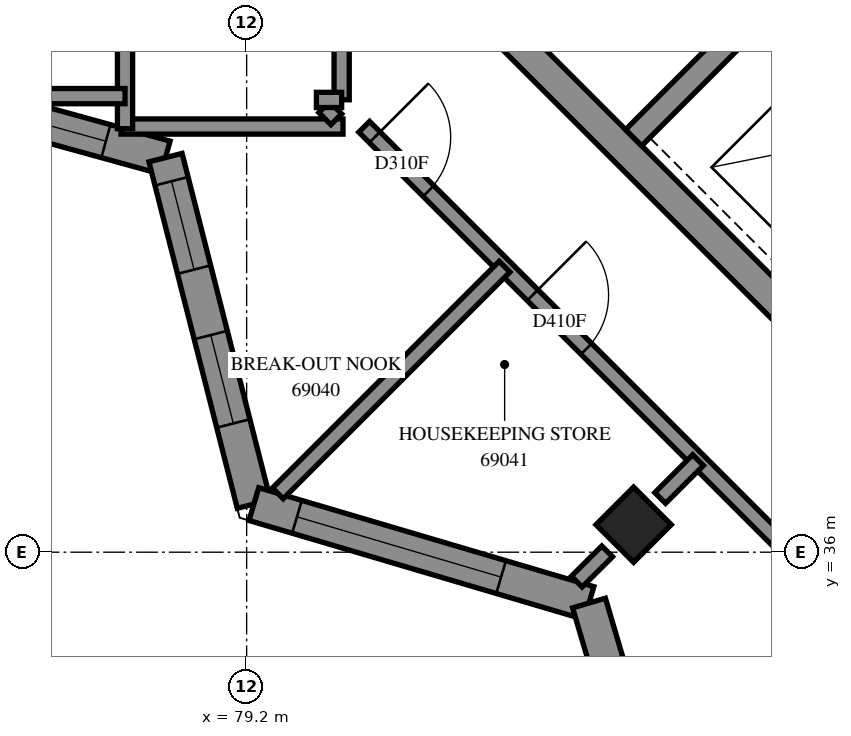
"""IFC4 building model, lengths in metres.
Left out: names, types, materials, properties, quantities, classifications, styles, units other than length and angle.
Written with IfcOpenShell. Run it as: python <this file> out.ifc"""

import sys

from ifc_helpers import new_model, si_unit, direction, frame, frame_2d, origin, origin_2d, place, context, subcontext, project, spatial, polyline, rectangle, outline, extrude, element, fill, save


model = new_model("IFC4")
c1 = context("Model", 3, precision=1e-05, world=origin(), true_north=direction((0.0, 1.0)))
c2 = subcontext(c1, "Body", "Model", "MODEL_VIEW")
j1 = project(units=[si_unit("LENGTHUNIT", "METRE"), si_unit("PLANEANGLEUNIT", "RADIAN")], contexts=[c1])
p1 = place(None, origin())
s1 = spatial("IfcSite", under=j1, at=p1, CompositionType="ELEMENT")
p2 = place(p1, origin())
s2 = spatial("IfcBuilding", under=s1, at=p2, CompositionType="ELEMENT")
p3 = place(p2, frame((0.0, 0.0, 254.0)))
s3 = spatial("IfcBuildingStorey", under=s2, at=p3, CompositionType="ELEMENT", Elevation=254.0)
p4 = place(p3, frame((84.291, 36.362, 0.0), z_axis=(0.0, 0.0, 1.0), x_axis=(0.7071067812, -0.7071067812, 0.0)))
e1 = element("IfcColumn", 1, at=p4, inside=s3, PredefinedType="COLUMN", context=c2, shape_type="SweptSolid", body=[
    extrude(rectangle(XDim=0.7, YDim=0.7, at=origin_2d()), origin(), (0.0, 0.0, 1.0), 3.1),
])
p5 = place(p3, frame((76.23, 49.231, -0.3), z_axis=(0.0, 0.0, 1.0), x_axis=(0.7071034917, -0.7071100706, 0.0)))
e2 = element("IfcWall", 2, at=p5, inside=s3, PredefinedType="SHEAR", context=c2, shape_type="SweptSolid", body=[
    extrude(rectangle(XDim=15.2, YDim=0.4, at=frame_2d((7.6, 0.0))), origin(), (0.0, 0.0, 1.0), 2.7),
])
p6 = place(p3, frame((84.291, 41.453, 0.0), z_axis=(0.0, 0.0, 1.0), x_axis=(0.7071067812, 0.7071067812, 0.0)))
e3 = element("IfcWall", 3, at=p6, inside=s3, PredefinedType="SOLIDWALL", context=c2, shape_type="SweptSolid", body=[
    extrude(rectangle(XDim=3.3, YDim=0.3, at=frame_2d((1.65, 0.0))), origin(), (0.0, 0.0, 1.0), 3.1),
])
p7 = place(p3, frame((78.988, 51.423, 0.0), z_axis=(0.0, 0.0, 1.0), x_axis=(0.7071067812, -0.7071067812, 0.0)))
e4 = element("IfcWall", 4, at=p7, inside=s3, PredefinedType="SOLIDWALL", context=c2, shape_type="SweptSolid", body=[
    extrude(rectangle(XDim=14.4, YDim=0.3, at=frame_2d((7.2, 0.0))), origin(), (0.0, 0.0, 1.0), 3.1),
])
p8 = place(p7, frame((1.35, 0.0, 0.0)))
e5 = element("IfcOpeningElement", 5, at=p8, cuts=e4, PredefinedType="OPENING", context=c2, shape_type="SweptSolid", body=[
    extrude(rectangle(XDim=0.9, YDim=2.1, at=frame_2d((0.45, 1.05))), frame((0.0, 0.16, 0.0), z_axis=(0.0, -1.0, 0.0), x_axis=(1.0, 0.0, 0.0)), (0.0, 0.0, 1.0), 0.32),
])
p9 = place(p7, frame((4.95, 0.0, 0.0)))
e6 = element("IfcOpeningElement", 6, at=p9, cuts=e4, PredefinedType="OPENING", context=c2, shape_type="SweptSolid", body=[
    extrude(rectangle(XDim=0.9, YDim=2.1, at=frame_2d((0.45, 1.05))), frame((0.0, 0.16, 0.0), z_axis=(0.0, -1.0, 0.0), x_axis=(1.0, 0.0, 0.0)), (0.0, 0.0, 1.0), 0.32),
])
p10 = place(p7, frame((8.55, 0.0, 0.0)))
e7 = element("IfcOpeningElement", 7, at=p10, cuts=e4, PredefinedType="OPENING", context=c2, shape_type="SweptSolid", body=[
    extrude(rectangle(XDim=0.9, YDim=2.1, at=frame_2d((0.45, 1.05))), frame((0.0, 0.16, 0.0), z_axis=(0.0, -1.0, 0.0), x_axis=(1.0, 0.0, 0.0)), (0.0, 0.0, 1.0), 0.32),
])
p11 = place(p7, frame((12.05, 0.0, 0.0)))
e8 = element("IfcOpeningElement", 8, at=p11, cuts=e4, PredefinedType="OPENING", context=c2, shape_type="SweptSolid", body=[
    extrude(rectangle(XDim=1.1, YDim=2.1, at=frame_2d((0.55, 1.05))), frame((0.0, 0.16, 0.0), z_axis=(0.0, -1.0, 0.0), x_axis=(1.0, 0.0, 0.0)), (0.0, 0.0, 1.0), 0.32),
])
p12 = place(p3, frame((74.372, 42.228, 0.0), z_axis=(0.0, 0.0, 1.0), x_axis=(0.9640145949, -0.2658493196, 0.0)))
e9 = element("IfcWall", 9, at=p12, inside=s3, PredefinedType="SOLIDWALL", context=c2, shape_type="SweptSolid", body=[
    extrude(outline(polyline([(0.043, -0.225), (3.771, -0.225), (4.032, 0.225), (-0.043, 0.225), (0.043, -0.225)])), origin(), (0.0, 0.0, 1.0), 3.1),
])
p13 = place(p12, frame((1.887, 0.0, 0.45)))
e10 = element("IfcOpeningElement", 10, at=p13, cuts=e9, PredefinedType="OPENING", context=c2, shape_type="SweptSolid", body=[
    extrude(rectangle(XDim=1.2, YDim=2.55, at=frame_2d((0.6, 1.275))), frame((0.0, 0.235, 0.0), z_axis=(0.0, -1.0, 0.0), x_axis=(1.0, 0.0, 0.0)), (0.0, 0.0, 1.0), 0.47),
])
p14 = place(p3, frame((78.133, 41.191, 0.0), z_axis=(0.0, 0.0, 1.0), x_axis=(0.2471093733, -0.9689875942, 0.0)))
e11 = element("IfcWall", 11, at=p14, inside=s3, PredefinedType="SOLIDWALL", context=c2, shape_type="SweptSolid", body=[
    extrude(outline(polyline([(0.131, -0.225), (4.832, -0.225), (4.577, 0.225), (-0.131, 0.225), (0.131, -0.225)])), origin(), (0.0, 0.0, 1.0), 3.1),
])
p15 = place(p14, frame((0.321, 0.0, 0.45)))
e12 = element("IfcOpeningElement", 12, at=p15, cuts=e11, PredefinedType="OPENING", context=c2, shape_type="SweptSolid", body=[
    extrude(rectangle(XDim=1.2, YDim=2.55, at=frame_2d((0.6, 1.275))), frame((0.0, 0.235, 0.0), z_axis=(0.0, -1.0, 0.0), x_axis=(1.0, 0.0, 0.0)), (0.0, 0.0, 1.0), 0.47),
])
p16 = place(p14, frame((2.409, 0.0, 0.45)))
e13 = element("IfcOpeningElement", 13, at=p16, cuts=e11, PredefinedType="OPENING", context=c2, shape_type="SweptSolid", body=[
    extrude(rectangle(XDim=1.2, YDim=2.55, at=frame_2d((0.6, 1.275))), frame((0.0, 0.235, 0.0), z_axis=(0.0, -1.0, 0.0), x_axis=(1.0, 0.0, 0.0)), (0.0, 0.0, 1.0), 0.47),
])
p17 = place(p3, frame((79.295, 36.633, 0.0), z_axis=(0.0, 0.0, 1.0), x_axis=(0.959077868, -0.2831424432, 0.0)))
e14 = element("IfcWall", 14, at=p17, inside=s3, PredefinedType="SOLIDWALL", context=c2, shape_type="SweptSolid", body=[
    extrude(outline(polyline([(-0.128, -0.225), (4.475, -0.225), (4.72, 0.225), (0.128, 0.225), (-0.128, -0.225)])), origin(), (0.0, 0.0, 1.0), 3.1),
])
p18 = place(p17, frame((0.591, 0.0, 0.45)))
e15 = element("IfcOpeningElement", 15, at=p18, cuts=e14, PredefinedType="OPENING", context=c2, shape_type="SweptSolid", body=[
    extrude(rectangle(XDim=2.8, YDim=2.55, at=frame_2d((1.4, 1.275))), frame((0.0, 0.235, 0.0), z_axis=(0.0, -1.0, 0.0), x_axis=(1.0, 0.0, 0.0)), (0.0, 0.0, 1.0), 0.47),
])
p19 = place(p3, frame((83.704, 35.331, 0.0), z_axis=(0.0, 0.0, 1.0), x_axis=(0.2831424432, -0.959077868, 0.0)))
e16 = element("IfcWall", 16, at=p19, inside=s3, PredefinedType="SOLIDWALL", context=c2, shape_type="SweptSolid", body=[
    extrude(outline(polyline([(0.122, -0.225), (4.725, -0.225), (4.469, 0.225), (-0.122, 0.225), (0.122, -0.225)])), origin(), (0.0, 0.0, 1.0), 3.1),
])
p20 = place(p19, frame((1.028, 0.0, 0.45)))
e17 = element("IfcOpeningElement", 17, at=p20, cuts=e16, PredefinedType="OPENING", context=c2, shape_type="SweptSolid", body=[
    extrude(rectangle(XDim=1.2, YDim=2.55, at=frame_2d((0.6, 1.275))), frame((0.0, 0.235, 0.0), z_axis=(0.0, -1.0, 0.0), x_axis=(1.0, 0.0, 0.0)), (0.0, 0.0, 1.0), 0.47),
])
p21 = place(p3, frame((84.944, 31.927, 0.0), z_axis=(0.0, 0.0, 1.0), x_axis=(0.7071768334, 0.7070367221, 0.0)))
e18 = element("IfcWall", 18, at=p21, inside=s3, PredefinedType="PARTITIONING", context=c2, shape_type="SweptSolid", body=[
    extrude(rectangle(XDim=14.274, YDim=0.2, at=frame_2d((7.137, 0.0))), origin(), (0.0, 0.0, 1.0), 3.1),
])
p22 = place(p3, frame((80.747, 41.597, 0.0), z_axis=(0.0, 0.0, 1.0), x_axis=(0.7071067812, -0.7071067812, 0.0)))
e19 = element("IfcWall", 19, at=p22, inside=s3, PredefinedType="PARTITIONING", context=c2, shape_type="SweptSolid", body=[
    extrude(rectangle(XDim=8.607, YDim=0.2, at=frame_2d((4.303, 0.0))), origin(), (0.0, 0.0, 1.0), 3.1),
])
p23 = place(p22, frame((0.195, 0.0, 0.0)))
e20 = element("IfcOpeningElement", 20, at=p23, cuts=e19, PredefinedType="OPENING", context=c2, shape_type="SweptSolid", body=[
    extrude(rectangle(XDim=1.0, YDim=2.1, at=frame_2d((0.5, 1.05))), frame((0.0, 0.11, 0.0), z_axis=(0.0, -1.0, 0.0), x_axis=(1.0, 0.0, 0.0)), (0.0, 0.0, 1.0), 0.22),
])
p24 = place(p22, frame((3.133, 0.0, 0.0)))
e21 = element("IfcOpeningElement", 21, at=p24, cuts=e19, PredefinedType="OPENING", context=c2, shape_type="SweptSolid", body=[
    extrude(rectangle(XDim=1.0, YDim=2.1, at=frame_2d((0.5, 1.05))), frame((0.0, 0.11, 0.0), z_axis=(0.0, -1.0, 0.0), x_axis=(1.0, 0.0, 0.0)), (0.0, 0.0, 1.0), 0.22),
])
p25 = place(p3, frame((79.611, 36.774, 0.0), z_axis=(0.0, 0.0, 1.0), x_axis=(0.7071186348, 0.7070949274, 0.0)))
e22 = element("IfcWall", 22, at=p25, inside=s3, PredefinedType="PARTITIONING", context=c2, shape_type="SweptSolid", body=[
    extrude(rectangle(XDim=4.218, YDim=0.2, at=frame_2d((2.109, 0.0))), origin(), (0.0, 0.0, 1.0), 3.1),
])
p26 = place(p3, frame((77.546, 41.6, 0.0), z_axis=(0.0, 0.0, 1.0), x_axis=(1.0, 0.0, 0.0)))
e23 = element("IfcWall", 23, at=p26, inside=s3, PredefinedType="PARTITIONING", context=c2, shape_type="SweptSolid", body=[
    extrude(rectangle(XDim=2.921, YDim=0.2, at=frame_2d((1.461, 0.0))), origin(), (0.0, 0.0, 1.0), 3.1),
])
p27 = place(p3, frame((77.6, 41.572, 0.0), z_axis=(0.0, 0.0, 1.0), x_axis=(0.0, 1.0, 0.0)))
e24 = element("IfcWall", 24, at=p27, inside=s3, PredefinedType="PARTITIONING", context=c2, shape_type="SweptSolid", body=[
    extrude(rectangle(XDim=2.897, YDim=0.2, at=frame_2d((1.448, 0.0))), origin(), (0.0, 0.0, 1.0), 3.1),
])
p28 = place(p3, frame((80.45, 41.952, 0.0), z_axis=(0.0, 0.0, 1.0), x_axis=(0.0, 1.0, 0.0)))
e25 = element("IfcWall", 25, at=p28, inside=s3, PredefinedType="PARTITIONING", context=c2, shape_type="SweptSolid", body=[
    extrude(rectangle(XDim=2.498, YDim=0.2, at=frame_2d((1.249, 0.0))), origin(), (0.0, 0.0, 1.0), 3.1),
])
p29 = place(p3, frame((76.096, 42.0, 0.0), z_axis=(0.0, 0.0, 1.0), x_axis=(1.0, 0.0, 0.0)))
e26 = element("IfcWall", 26, at=p29, inside=s3, PredefinedType="PARTITIONING", context=c2, shape_type="SweptSolid", body=[
    extrude(rectangle(XDim=1.504, YDim=0.2, at=frame_2d((0.752, 0.0))), origin(), (0.0, 0.0, 1.0), 3.1),
])
p30 = place(p3, frame((84.641, 36.713, 0.0), z_axis=(0.0, 0.0, 1.0), x_axis=(0.7071067812, 0.7071067812, 0.0)))
e27 = element("IfcWall", 27, at=p30, inside=s3, PredefinedType="PARTITIONING", context=c2, shape_type="SweptSolid", body=[
    extrude(rectangle(XDim=0.704, YDim=0.2, at=frame_2d((0.352, 0.0))), origin(), (0.0, 0.0, 1.0), 3.1),
])
p31 = place(p3, frame((83.543, 35.613, 0.0), z_axis=(0.0, 0.0, 1.0), x_axis=(0.7092312739, 0.7049758862, 0.0)))
e28 = element("IfcWall", 28, at=p31, inside=s3, PredefinedType="PARTITIONING", context=c2, shape_type="SweptSolid", body=[
    extrude(rectangle(XDim=0.564, YDim=0.2, at=frame_2d((0.282, 0.0))), origin(), (0.0, 0.0, 1.0), 3.1),
])
p32 = place(p3, frame((80.221, 41.855, 0.0), z_axis=(0.0, 0.0, 1.0), x_axis=(0.7068844555, -0.707329037, 0.0)))
e29 = element("IfcWall", 29, at=p32, inside=s3, PredefinedType="PARTITIONING", context=c2, shape_type="SweptSolid", body=[
    extrude(rectangle(XDim=0.225, YDim=0.2, at=frame_2d((0.112, 0.0))), origin(), (0.0, 0.0, 1.0), 3.1),
])
p33 = place(p3, frame((80.118, 41.95, 0.0), z_axis=(0.0, 0.0, 1.0), x_axis=(1.0, 0.0, 0.0)))
e30 = element("IfcWall", 30, at=p33, inside=s3, PredefinedType="PARTITIONING", context=c2, shape_type="SweptSolid", body=[
    extrude(rectangle(XDim=0.332, YDim=0.2, at=frame_2d((0.166, 0.0))), origin(), (0.0, 0.0, 1.0), 3.1),
])
p34 = place(p13, origin())
e31 = element("IfcWindow", 31, at=p34, inside=s3, PartitioningType="SINGLE_PANEL", PredefinedType="WINDOW", context=c2, shape_type="SweptSolid", body=[
    extrude(rectangle(XDim=1.2, YDim=2.55, at=frame_2d((0.6, 1.275))), frame((0.0, 0.145, 0.0), z_axis=(0.0, -1.0, 0.0), x_axis=(1.0, 0.0, 0.0)), (0.0, 0.0, 1.0), 0.06),
])
fill(e10, e31)
p35 = place(p15, origin())
e32 = element("IfcWindow", 32, at=p35, inside=s3, PartitioningType="SINGLE_PANEL", PredefinedType="WINDOW", context=c2, shape_type="SweptSolid", body=[
    extrude(rectangle(XDim=1.2, YDim=2.55, at=frame_2d((0.6, 1.275))), frame((0.0, 0.205, 0.0), z_axis=(0.0, -1.0, 0.0), x_axis=(1.0, 0.0, 0.0)), (0.0, 0.0, 1.0), 0.06),
])
fill(e12, e32)
p36 = place(p16, origin())
e33 = element("IfcWindow", 33, at=p36, inside=s3, PartitioningType="SINGLE_PANEL", PredefinedType="WINDOW", context=c2, shape_type="SweptSolid", body=[
    extrude(rectangle(XDim=1.2, YDim=2.55, at=frame_2d((0.6, 1.275))), frame((0.0, 0.205, 0.0), z_axis=(0.0, -1.0, 0.0), x_axis=(1.0, 0.0, 0.0)), (0.0, 0.0, 1.0), 0.06),
])
fill(e13, e33)
p37 = place(p18, origin())
e34 = element("IfcWindow", 34, at=p37, inside=s3, PartitioningType="SINGLE_PANEL", PredefinedType="WINDOW", context=c2, shape_type="SweptSolid", body=[
    extrude(rectangle(XDim=2.8, YDim=2.55, at=frame_2d((1.4, 1.275))), frame((0.0, 0.205, 0.0), z_axis=(0.0, -1.0, 0.0), x_axis=(1.0, 0.0, 0.0)), (0.0, 0.0, 1.0), 0.06),
])
fill(e15, e34)
p38 = place(p23, origin())
e35 = element("IfcDoor", 35, at=p38, inside=s3, OperationType="SINGLE_SWING_LEFT", PredefinedType="DOOR", context=c2, shape_type="SweptSolid", body=[
    extrude(rectangle(XDim=1.0, YDim=2.1, at=frame_2d((0.5, 1.05))), frame((0.0, 0.025, 0.0), z_axis=(0.0, -1.0, 0.0), x_axis=(1.0, 0.0, 0.0)), (0.0, 0.0, 1.0), 0.05),
])
fill(e20, e35)
p39 = place(p24, origin())
e36 = element("IfcDoor", 36, at=p39, inside=s3, OperationType="SINGLE_SWING_LEFT", PredefinedType="DOOR", context=c2, shape_type="SweptSolid", body=[
    extrude(rectangle(XDim=1.0, YDim=2.1, at=frame_2d((0.5, 1.05))), frame((0.0, 0.025, 0.0), z_axis=(0.0, -1.0, 0.0), x_axis=(1.0, 0.0, 0.0)), (0.0, 0.0, 1.0), 0.05),
])
fill(e21, e36)
save(model, sys.argv[1])
